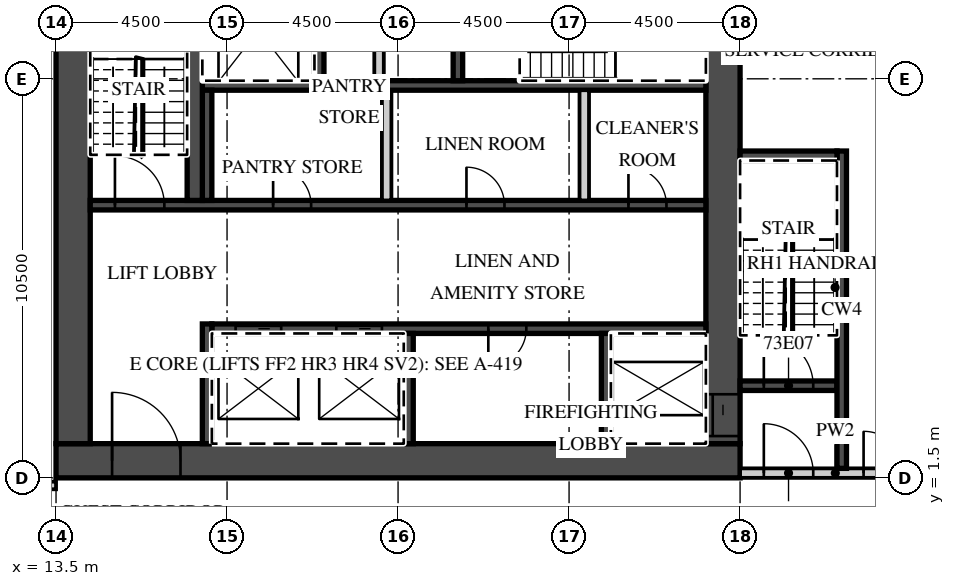
"""IFC4 building model, lengths in metres.
Left out: names, types, materials, properties, quantities, classifications, styles, units other than length and angle.
Written with IfcOpenShell. Run it as: python <this file> out.ifc"""

import sys

from ifc_helpers import new_model, si_unit, direction, frame, frame_2d, origin, place, context, subcontext, project, spatial, rectangle, extrude, element, fill, save


model = new_model("IFC4")
c1 = context("Model", 3, precision=1e-05, world=origin(), true_north=direction((0.0, 1.0)))
c2 = subcontext(c1, "Body", "Model", "MODEL_VIEW")
j1 = project(units=[si_unit("LENGTHUNIT", "METRE"), si_unit("PLANEANGLEUNIT", "RADIAN")], contexts=[c1])
p1 = place(None, origin())
s1 = spatial("IfcSite", under=j1, at=p1, CompositionType="ELEMENT")
p2 = place(p1, origin())
s2 = spatial("IfcBuilding", under=s1, at=p2, CompositionType="ELEMENT")
p3 = place(p2, frame((0.0, 0.0, 291.6)))
s3 = spatial("IfcBuildingStorey", under=s2, at=p3, CompositionType="ELEMENT", Elevation=291.6)
p4 = place(p3, frame((38.132, -12.858, 0.0), z_axis=(0.0, 0.0, 1.0), x_axis=(-0.095847749461, 0.995396006082, 0.0)))
e1 = element("IfcWall", 1, at=p4, inside=s3, PredefinedType="SOLIDWALL", context=c2, shape_type="SweptSolid", body=[
    extrude(rectangle(XDim=32.0, YDim=0.45, at=frame_2d((16.0, 0.0))), origin(), (0.0, 0.0, 1.0), 3.02),
])
p5 = place(p3, frame((-39.909, 1.3, 0.0), z_axis=(0.0, 0.0, 1.0), x_axis=(1.0, 0.0, 0.0)))
e2 = element("IfcWall", 2, at=p5, inside=s3, PredefinedType="PARTITIONING", context=c2, shape_type="SweptSolid", body=[
    extrude(rectangle(XDim=53.409, YDim=0.2, at=frame_2d((26.705, 0.0))), origin(), (0.0, 0.0, 1.0), 3.02),
])
p6 = place(p5, frame((0.255, 0.0, 0.0)))
e3 = element("IfcOpeningElement", 3, at=p6, cuts=e2, PredefinedType="OPENING", context=c2, shape_type="SweptSolid", body=[
    extrude(rectangle(XDim=0.9, YDim=2.1, at=frame_2d((0.45, 1.05))), frame((0.0, 0.11, 0.0), z_axis=(0.0, -1.0, 0.0), x_axis=(1.0, 0.0, 0.0)), (0.0, 0.0, 1.0), 0.22),
])
p7 = place(p5, frame((6.347, 0.0, 0.0)))
e4 = element("IfcOpeningElement", 4, at=p7, cuts=e2, PredefinedType="OPENING", context=c2, shape_type="SweptSolid", body=[
    extrude(rectangle(XDim=1.2, YDim=2.1, at=frame_2d((0.6, 1.05))), frame((0.0, 0.11, 0.0), z_axis=(0.0, -1.0, 0.0), x_axis=(1.0, 0.0, 0.0)), (0.0, 0.0, 1.0), 0.22),
])
p8 = place(p5, frame((13.484, 0.0, 0.0)))
e5 = element("IfcOpeningElement", 5, at=p8, cuts=e2, PredefinedType="OPENING", context=c2, shape_type="SweptSolid", body=[
    extrude(rectangle(XDim=1.0, YDim=2.1, at=frame_2d((0.5, 1.05))), frame((0.0, 0.11, 0.0), z_axis=(0.0, -1.0, 0.0), x_axis=(1.0, 0.0, 0.0)), (0.0, 0.0, 1.0), 0.22),
])
p9 = place(p5, frame((20.334, 0.0, 0.0)))
e6 = element("IfcOpeningElement", 6, at=p9, cuts=e2, PredefinedType="OPENING", context=c2, shape_type="SweptSolid", body=[
    extrude(rectangle(XDim=1.0, YDim=2.1, at=frame_2d((0.5, 1.05))), frame((0.0, 0.11, 0.0), z_axis=(0.0, -1.0, 0.0), x_axis=(1.0, 0.0, 0.0)), (0.0, 0.0, 1.0), 0.22),
])
p10 = place(p5, frame((22.484, 0.0, 0.0)))
e7 = element("IfcOpeningElement", 7, at=p10, cuts=e2, PredefinedType="OPENING", context=c2, shape_type="SweptSolid", body=[
    extrude(rectangle(XDim=1.0, YDim=2.1, at=frame_2d((0.5, 1.05))), frame((0.0, 0.11, 0.0), z_axis=(0.0, -1.0, 0.0), x_axis=(1.0, 0.0, 0.0)), (0.0, 0.0, 1.0), 0.22),
])
p11 = place(p5, frame((26.959, 0.0, 0.0)))
e8 = element("IfcOpeningElement", 8, at=p11, cuts=e2, PredefinedType="OPENING", context=c2, shape_type="SweptSolid", body=[
    extrude(rectangle(XDim=1.0, YDim=2.1, at=frame_2d((0.5, 1.05))), frame((0.0, 0.11, 0.0), z_axis=(0.0, -1.0, 0.0), x_axis=(1.0, 0.0, 0.0)), (0.0, 0.0, 1.0), 0.22),
])
p12 = place(p5, frame((36.271, 0.0, 0.0)))
e9 = element("IfcOpeningElement", 9, at=p12, cuts=e2, PredefinedType="OPENING", context=c2, shape_type="SweptSolid", body=[
    extrude(rectangle(XDim=1.2, YDim=2.1, at=frame_2d((0.6, 1.05))), frame((0.0, 0.11, 0.0), z_axis=(0.0, -1.0, 0.0), x_axis=(1.0, 0.0, 0.0)), (0.0, 0.0, 1.0), 0.22),
])
p13 = place(p5, frame((40.484, 0.0, 0.0)))
e10 = element("IfcOpeningElement", 10, at=p13, cuts=e2, PredefinedType="OPENING", context=c2, shape_type="SweptSolid", body=[
    extrude(rectangle(XDim=1.0, YDim=2.1, at=frame_2d((0.5, 1.05))), frame((0.0, 0.11, 0.0), z_axis=(0.0, -1.0, 0.0), x_axis=(1.0, 0.0, 0.0)), (0.0, 0.0, 1.0), 0.22),
])
p14 = place(p5, frame((44.959, 0.0, 0.0)))
e11 = element("IfcOpeningElement", 11, at=p14, cuts=e2, PredefinedType="OPENING", context=c2, shape_type="SweptSolid", body=[
    extrude(rectangle(XDim=1.0, YDim=2.1, at=frame_2d((0.5, 1.05))), frame((0.0, 0.11, 0.0), z_axis=(0.0, -1.0, 0.0), x_axis=(1.0, 0.0, 0.0)), (0.0, 0.0, 1.0), 0.22),
])
p15 = place(p5, frame((51.834, 0.0, 0.0)))
e12 = element("IfcOpeningElement", 12, at=p15, cuts=e2, PredefinedType="OPENING", context=c2, shape_type="SweptSolid", body=[
    extrude(rectangle(XDim=1.0, YDim=2.1, at=frame_2d((0.5, 1.05))), frame((0.0, 0.11, 0.0), z_axis=(0.0, -1.0, 0.0), x_axis=(1.0, 0.0, 0.0)), (0.0, 0.0, 1.0), 0.22),
])
p16 = place(p3, frame((13.5, 1.95, 0.0), z_axis=(0.0, 0.0, 1.0), x_axis=(1.0, 0.0, 0.0)))
e13 = element("IfcWall", 13, at=p16, inside=s3, PredefinedType="SHEAR", context=c2, shape_type="SweptSolid", body=[
    extrude(rectangle(XDim=18.0, YDim=0.9, at=frame_2d((9.0, 0.0))), origin(), (0.0, 0.0, 1.0), 3.02),
])
p17 = place(p16, frame((1.475, 0.0, 0.0)))
e14 = element("IfcOpeningElement", 14, at=p17, cuts=e13, PredefinedType="OPENING", context=c2, shape_type="SweptSolid", body=[
    extrude(rectangle(XDim=1.8, YDim=2.1, at=frame_2d((0.9, 1.05))), frame((0.0, 0.46, 0.0), z_axis=(0.0, -1.0, 0.0), x_axis=(1.0, 0.0, 0.0)), (0.0, 0.0, 1.0), 0.92),
])
p18 = place(p3, frame((31.05, 2.4, 0.0), z_axis=(0.0, 0.0, 1.0), x_axis=(0.0, 1.0, 0.0)))
e15 = element("IfcWall", 15, at=p18, inside=s3, PredefinedType="SHEAR", context=c2, shape_type="SweptSolid", body=[
    extrude(rectangle(XDim=12.8, YDim=0.9, at=frame_2d((6.4, 0.0))), origin(), (0.0, 0.0, 1.0), 3.02),
])
p19 = place(p18, frame((0.2, 0.0, 0.0)))
e16 = element("IfcOpeningElement", 16, at=p19, cuts=e15, PredefinedType="OPENING", context=c2, shape_type="SweptSolid", body=[
    extrude(rectangle(XDim=1.1, YDim=2.1, at=frame_2d((0.55, 1.05))), frame((0.0, 0.46, 0.0), z_axis=(0.0, -1.0, 0.0), x_axis=(1.0, 0.0, 0.0)), (0.0, 0.0, 1.0), 0.92),
])
p20 = place(p3, frame((13.95, 2.4, 0.0), z_axis=(0.0, 0.0, 1.0), x_axis=(0.0, 1.0, 0.0)))
e17 = element("IfcWall", 17, at=p20, inside=s3, PredefinedType="SHEAR", context=c2, shape_type="SweptSolid", body=[
    extrude(rectangle(XDim=12.2, YDim=0.9, at=frame_2d((6.1, 0.0))), origin(), (0.0, 0.0, 1.0), 3.02),
])
p21 = place(p3, frame((17.6, 5.425, 0.0), z_axis=(0.0, 0.0, 1.0), x_axis=(1.0, 0.0, 0.0)))
e18 = element("IfcWall", 18, at=p21, inside=s3, PredefinedType="SHEAR", context=c2, shape_type="SweptSolid", body=[
    extrude(rectangle(XDim=13.0, YDim=0.25, at=frame_2d((6.5, 0.0))), origin(), (0.0, 0.0, 1.0), 3.02),
])
p22 = place(p21, frame((3.275, 0.0, 0.0)))
e19 = element("IfcOpeningElement", 19, at=p22, cuts=e18, PredefinedType="OPENING", context=c2, shape_type="SweptSolid", body=[
    extrude(rectangle(XDim=1.2, YDim=2.1, at=frame_2d((0.6, 1.05))), frame((0.0, 0.135, 0.0), z_axis=(0.0, -1.0, 0.0), x_axis=(1.0, 0.0, 0.0)), (0.0, 0.0, 1.0), 0.27),
])
p23 = place(p21, frame((0.625, 0.0, 0.0)))
e20 = element("IfcOpeningElement", 20, at=p23, cuts=e18, PredefinedType="OPENING", context=c2, shape_type="SweptSolid", body=[
    extrude(rectangle(XDim=1.2, YDim=2.1, at=frame_2d((0.6, 1.05))), frame((0.0, 0.135, 0.0), z_axis=(0.0, -1.0, 0.0), x_axis=(1.0, 0.0, 0.0)), (0.0, 0.0, 1.0), 0.27),
])
p24 = place(p21, frame((7.275, 0.0, 0.0)))
e21 = element("IfcOpeningElement", 21, at=p24, cuts=e18, PredefinedType="OPENING", context=c2, shape_type="SweptSolid", body=[
    extrude(rectangle(XDim=1.0, YDim=2.1, at=frame_2d((0.5, 1.05))), frame((0.0, 0.135, 0.0), z_axis=(0.0, -1.0, 0.0), x_axis=(1.0, 0.0, 0.0)), (0.0, 0.0, 1.0), 0.27),
])
p25 = place(p3, frame((17.475, 2.4, 0.0), z_axis=(0.0, 0.0, 1.0), x_axis=(0.0, 1.0, 0.0)))
e22 = element("IfcWall", 22, at=p25, inside=s3, PredefinedType="SHEAR", context=c2, shape_type="SweptSolid", body=[
    extrude(rectangle(XDim=3.15, YDim=0.25, at=frame_2d((1.575, 0.0))), origin(), (0.0, 0.0, 1.0), 3.02),
])
for number, where, z_axis, x_axis in (
    (23, (27.975, 2.4, 0.0), (0.0, 0.0, 1.0), (0.0, 1.0, 0.0)),
    (24, (22.775, 2.4, 0.0), (0.0, 0.0, 1.0), (0.0, 1.0, 0.0)),
):
    element("IfcWall", number, at=place(p3, frame(where, z_axis=z_axis, x_axis=x_axis)), inside=s3, PredefinedType="SHEAR", context=c2, shape_type="SweptSolid", body=[
        extrude(rectangle(XDim=2.9, YDim=0.25, at=frame_2d((1.45, 0.0))), origin(), (0.0, 0.0, 1.0), 3.02),
    ])
p26 = place(p3, frame((14.4, 8.675, 0.0), z_axis=(0.0, 0.0, 1.0), x_axis=(1.0, 0.0, 0.0)))
e25 = element("IfcWall", 25, at=p26, inside=s3, PredefinedType="SHEAR", context=c2, shape_type="SweptSolid", body=[
    extrude(rectangle(XDim=16.2, YDim=0.25, at=frame_2d((8.1, 0.0))), origin(), (0.0, 0.0, 1.0), 3.02),
])
p27 = place(p26, frame((0.65, 0.0, 0.0)))
e26 = element("IfcOpeningElement", 26, at=p27, cuts=e25, PredefinedType="OPENING", context=c2, shape_type="SweptSolid", body=[
    extrude(rectangle(XDim=1.3, YDim=2.1, at=frame_2d((0.65, 1.05))), frame((0.0, 0.135, 0.0), z_axis=(0.0, -1.0, 0.0), x_axis=(1.0, 0.0, 0.0)), (0.0, 0.0, 1.0), 0.27),
])
p28 = place(p26, frame((14.163, 0.0, 0.0)))
e27 = element("IfcOpeningElement", 27, at=p28, cuts=e25, PredefinedType="OPENING", context=c2, shape_type="SweptSolid", body=[
    extrude(rectangle(XDim=1.0, YDim=2.1, at=frame_2d((0.5, 1.05))), frame((0.0, 0.135, 0.0), z_axis=(0.0, -1.0, 0.0), x_axis=(1.0, 0.0, 0.0)), (0.0, 0.0, 1.0), 0.27),
])
p29 = place(p26, frame((9.9, 0.0, 0.0)))
e28 = element("IfcOpeningElement", 28, at=p29, cuts=e25, PredefinedType="OPENING", context=c2, shape_type="SweptSolid", body=[
    extrude(rectangle(XDim=1.0, YDim=2.1, at=frame_2d((0.5, 1.05))), frame((0.0, 0.135, 0.0), z_axis=(0.0, -1.0, 0.0), x_axis=(1.0, 0.0, 0.0)), (0.0, 0.0, 1.0), 0.27),
])
p30 = place(p26, frame((4.812, 0.0, 0.0)))
e29 = element("IfcOpeningElement", 29, at=p30, cuts=e25, PredefinedType="OPENING", context=c2, shape_type="SweptSolid", body=[
    extrude(rectangle(XDim=1.0, YDim=2.1, at=frame_2d((0.5, 1.05))), frame((0.0, 0.135, 0.0), z_axis=(0.0, -1.0, 0.0), x_axis=(1.0, 0.0, 0.0)), (0.0, 0.0, 1.0), 0.27),
])
p31 = place(p3, frame((17.35, 11.825, 0.0), z_axis=(0.0, 0.0, 1.0), x_axis=(1.0, 0.0, 0.0)))
e30 = element("IfcWall", 30, at=p31, inside=s3, PredefinedType="SHEAR", context=c2, shape_type="SweptSolid", body=[
    extrude(rectangle(XDim=13.25, YDim=0.25, at=frame_2d((6.625, 0.0))), origin(), (0.0, 0.0, 1.0), 3.02),
])
p32 = place(p3, frame((17.475, 8.8, 0.0), z_axis=(0.0, 0.0, 1.0), x_axis=(0.0, 1.0, 0.0)))
e31 = element("IfcWall", 31, at=p32, inside=s3, PredefinedType="SHEAR", context=c2, shape_type="SweptSolid", body=[
    extrude(rectangle(XDim=2.9, YDim=0.25, at=frame_2d((1.45, 0.0))), origin(), (0.0, 0.0, 1.0), 3.02),
])
for number, where, z_axis, x_axis in (
    (32, (27.4, 8.8, 0.0), (0.0, 0.0, 1.0), (0.0, 1.0, 0.0)),
    (33, (22.2, 8.8, 0.0), (0.0, 0.0, 1.0), (0.0, 1.0, 0.0)),
):
    element("IfcWall", number, at=place(p3, frame(where, z_axis=z_axis, x_axis=x_axis)), inside=s3, PredefinedType="PARTITIONING", context=c2, shape_type="SweptSolid", body=[
        extrude(rectangle(XDim=2.9, YDim=0.25, at=frame_2d((1.45, 0.0))), origin(), (0.0, 0.0, 1.0), 3.02),
    ])
p33 = place(p3, frame((17.15, 8.8, 0.0), z_axis=(0.0, 0.0, 1.0), x_axis=(0.0, 1.0, 0.0)))
e34 = element("IfcWall", 34, at=p33, inside=s3, PredefinedType="SHEAR", context=c2, shape_type="SweptSolid", body=[
    extrude(rectangle(XDim=5.8, YDim=0.4, at=frame_2d((2.9, 0.0))), origin(), (0.0, 0.0, 1.0), 3.02),
])
for number, where, z_axis, x_axis in (
    (35, (20.425, 11.95, 0.0), (0.0, 0.0, 1.0), (0.0, 1.0, 0.0)),
    (36, (24.075, 11.95, 0.0), (0.0, 0.0, 1.0), (0.0, 1.0, 0.0)),
):
    element("IfcWall", number, at=place(p3, frame(where, z_axis=z_axis, x_axis=x_axis)), inside=s3, PredefinedType="SHEAR", context=c2, shape_type="SweptSolid", body=[
        extrude(rectangle(XDim=3.25, YDim=0.25, at=frame_2d((1.625, 0.0))), origin(), (0.0, 0.0, 1.0), 3.02),
    ])
p34 = place(p3, frame((22.0, 11.95, 0.0), z_axis=(0.0, 0.0, 1.0), x_axis=(0.0, 1.0, 0.0)))
e37 = element("IfcWall", 37, at=p34, inside=s3, PredefinedType="PARTITIONING", context=c2, shape_type="SweptSolid", body=[
    extrude(rectangle(XDim=3.25, YDim=0.25, at=frame_2d((1.625, 0.0))), origin(), (0.0, 0.0, 1.0), 3.02),
])
p35 = place(p3, frame((31.5, 1.625, 0.0), z_axis=(0.0, 0.0, 1.0), x_axis=(1.0, 0.0, 0.0)))
e38 = element("IfcWall", 38, at=p35, inside=s3, PredefinedType="PARTITIONING", context=c2, shape_type="SweptSolid", body=[
    extrude(rectangle(XDim=5.012, YDim=0.25, at=frame_2d((2.506, 0.0))), origin(), (0.0, 0.0, 1.0), 3.02),
])
p36 = place(p35, frame((0.625, 0.0, 0.0)))
e39 = element("IfcOpeningElement", 39, at=p36, cuts=e38, PredefinedType="OPENING", context=c2, shape_type="SweptSolid", body=[
    extrude(rectangle(XDim=1.3, YDim=2.1, at=frame_2d((0.65, 1.05))), frame((0.0, 0.135, 0.0), z_axis=(0.0, -1.0, 0.0), x_axis=(1.0, 0.0, 0.0)), (0.0, 0.0, 1.0), 0.27),
])
p37 = place(p35, frame((3.25, 0.0, 0.0)))
e40 = element("IfcOpeningElement", 40, at=p37, cuts=e38, PredefinedType="OPENING", context=c2, shape_type="SweptSolid", body=[
    extrude(rectangle(XDim=1.1, YDim=2.1, at=frame_2d((0.55, 1.05))), frame((0.0, 0.135, 0.0), z_axis=(0.0, -1.0, 0.0), x_axis=(1.0, 0.0, 0.0)), (0.0, 0.0, 1.0), 0.27),
])
p38 = place(p3, frame((31.5, 3.925, 0.0), z_axis=(0.0, 0.0, 1.0), x_axis=(1.0, 0.0, 0.0)))
e41 = element("IfcWall", 41, at=p38, inside=s3, PredefinedType="SHEAR", context=c2, shape_type="SweptSolid", body=[
    extrude(rectangle(XDim=2.55, YDim=0.25, at=frame_2d((1.275, 0.0))), origin(), (0.0, 0.0, 1.0), 3.02),
])
p39 = place(p38, frame((0.625, 0.0, 0.0)))
e42 = element("IfcOpeningElement", 42, at=p39, cuts=e41, PredefinedType="OPENING", context=c2, shape_type="SweptSolid", body=[
    extrude(rectangle(XDim=1.3, YDim=2.1, at=frame_2d((0.65, 1.05))), frame((0.0, 0.135, 0.0), z_axis=(0.0, -1.0, 0.0), x_axis=(1.0, 0.0, 0.0)), (0.0, 0.0, 1.0), 0.27),
])
p40 = place(p3, frame((34.175, 1.75, 0.0), z_axis=(0.0, 0.0, 1.0), x_axis=(0.0, 1.0, 0.0)))
e43 = element("IfcWall", 43, at=p40, inside=s3, PredefinedType="SHEAR", context=c2, shape_type="SweptSolid", body=[
    extrude(rectangle(XDim=8.35, YDim=0.25, at=frame_2d((4.175, 0.0))), origin(), (0.0, 0.0, 1.0), 3.02),
])
p41 = place(p3, frame((31.5, 9.975, 0.0), z_axis=(0.0, 0.0, 1.0), x_axis=(1.0, 0.0, 0.0)))
e44 = element("IfcWall", 44, at=p41, inside=s3, PredefinedType="SHEAR", context=c2, shape_type="SweptSolid", body=[
    extrude(rectangle(XDim=2.55, YDim=0.25, at=frame_2d((1.275, 0.0))), origin(), (0.0, 0.0, 1.0), 3.02),
])
p42 = place(p22, origin())
e45 = element("IfcDoor", 45, at=p42, inside=s3, OperationType="SLIDING_TO_RIGHT", PredefinedType="DOOR", context=c2, shape_type="SweptSolid", body=[
    extrude(rectangle(XDim=1.2, YDim=2.1, at=frame_2d((0.6, 1.05))), frame((0.0, 0.025, 0.0), z_axis=(0.0, -1.0, 0.0), x_axis=(1.0, 0.0, 0.0)), (0.0, 0.0, 1.0), 0.05),
])
fill(e19, e45)
p43 = place(p23, origin())
e46 = element("IfcDoor", 46, at=p43, inside=s3, OperationType="SLIDING_TO_LEFT", PredefinedType="DOOR", context=c2, shape_type="SweptSolid", body=[
    extrude(rectangle(XDim=1.2, YDim=2.1, at=frame_2d((0.6, 1.05))), frame((0.0, 0.025, 0.0), z_axis=(0.0, -1.0, 0.0), x_axis=(1.0, 0.0, 0.0)), (0.0, 0.0, 1.0), 0.05),
])
fill(e20, e46)
p44 = place(p19, origin())
e47 = element("IfcDoor", 47, at=p44, inside=s3, OperationType="SLIDING_TO_LEFT", PredefinedType="DOOR", context=c2, shape_type="SweptSolid", body=[
    extrude(rectangle(XDim=1.1, YDim=2.1, at=frame_2d((0.55, 1.05))), frame((0.0, 0.025, 0.0), z_axis=(0.0, -1.0, 0.0), x_axis=(1.0, 0.0, 0.0)), (0.0, 0.0, 1.0), 0.05),
])
fill(e16, e47)
p45 = place(p17, origin())
e48 = element("IfcDoor", 48, at=p45, inside=s3, OperationType="DOUBLE_DOOR_DOUBLE_SWING", PredefinedType="DOOR", context=c2, shape_type="SweptSolid", body=[
    extrude(rectangle(XDim=1.8, YDim=2.1, at=frame_2d((0.9, 1.05))), frame((0.0, 0.025, 0.0), z_axis=(0.0, -1.0, 0.0), x_axis=(1.0, 0.0, 0.0)), (0.0, 0.0, 1.0), 0.05),
])
fill(e14, e48)
p46 = place(p36, origin())
e49 = element("IfcDoor", 49, at=p46, inside=s3, OperationType="SINGLE_SWING_LEFT", PredefinedType="DOOR", context=c2, shape_type="SweptSolid", body=[
    extrude(rectangle(XDim=1.3, YDim=2.1, at=frame_2d((0.65, 1.05))), frame((0.0, 0.025, 0.0), z_axis=(0.0, -1.0, 0.0), x_axis=(1.0, 0.0, 0.0)), (0.0, 0.0, 1.0), 0.05),
])
fill(e39, e49)
p47 = place(p39, origin())
e50 = element("IfcDoor", 50, at=p47, inside=s3, OperationType="SINGLE_SWING_LEFT", PredefinedType="DOOR", context=c2, shape_type="SweptSolid", body=[
    extrude(rectangle(XDim=1.3, YDim=2.1, at=frame_2d((0.65, 1.05))), frame((0.0, 0.025, 0.0), z_axis=(0.0, -1.0, 0.0), x_axis=(1.0, 0.0, 0.0)), (0.0, 0.0, 1.0), 0.05),
])
fill(e42, e50)
p48 = place(p37, origin())
e51 = element("IfcDoor", 51, at=p48, inside=s3, OperationType="SINGLE_SWING_LEFT", PredefinedType="DOOR", context=c2, shape_type="SweptSolid", body=[
    extrude(rectangle(XDim=1.1, YDim=2.1, at=frame_2d((0.55, 1.05))), frame((0.0, 0.025, 0.0), z_axis=(0.0, -1.0, 0.0), x_axis=(1.0, 0.0, 0.0)), (0.0, 0.0, 1.0), 0.05),
])
fill(e40, e51)
p49 = place(p27, origin())
e52 = element("IfcDoor", 52, at=p49, inside=s3, OperationType="SINGLE_SWING_LEFT", PredefinedType="DOOR", context=c2, shape_type="SweptSolid", body=[
    extrude(rectangle(XDim=1.3, YDim=2.1, at=frame_2d((0.65, 1.05))), frame((0.0, 0.025, 0.0), z_axis=(0.0, -1.0, 0.0), x_axis=(1.0, 0.0, 0.0)), (0.0, 0.0, 1.0), 0.05),
])
fill(e26, e52)
p50 = place(p28, origin())
e53 = element("IfcDoor", 53, at=p50, inside=s3, OperationType="SINGLE_SWING_LEFT", PredefinedType="DOOR", context=c2, shape_type="SweptSolid", body=[
    extrude(rectangle(XDim=1.0, YDim=2.1, at=frame_2d((0.5, 1.05))), frame((0.0, 0.025, 0.0), z_axis=(0.0, -1.0, 0.0), x_axis=(1.0, 0.0, 0.0)), (0.0, 0.0, 1.0), 0.05),
])
fill(e27, e53)
p51 = place(p29, origin())
e54 = element("IfcDoor", 54, at=p51, inside=s3, OperationType="SINGLE_SWING_LEFT", PredefinedType="DOOR", context=c2, shape_type="SweptSolid", body=[
    extrude(rectangle(XDim=1.0, YDim=2.1, at=frame_2d((0.5, 1.05))), frame((0.0, 0.025, 0.0), z_axis=(0.0, -1.0, 0.0), x_axis=(1.0, 0.0, 0.0)), (0.0, 0.0, 1.0), 0.05),
])
fill(e28, e54)
p52 = place(p30, origin())
e55 = element("IfcDoor", 55, at=p52, inside=s3, OperationType="SINGLE_SWING_LEFT", PredefinedType="DOOR", context=c2, shape_type="SweptSolid", body=[
    extrude(rectangle(XDim=1.0, YDim=2.1, at=frame_2d((0.5, 1.05))), frame((0.0, 0.025, 0.0), z_axis=(0.0, -1.0, 0.0), x_axis=(1.0, 0.0, 0.0)), (0.0, 0.0, 1.0), 0.05),
])
fill(e29, e55)
p53 = place(p24, origin())
e56 = element("IfcDoor", 56, at=p53, inside=s3, OperationType="SINGLE_SWING_LEFT", PredefinedType="DOOR", context=c2, shape_type="SweptSolid", body=[
    extrude(rectangle(XDim=1.0, YDim=2.1, at=frame_2d((0.5, 1.05))), frame((0.0, 0.025, 0.0), z_axis=(0.0, -1.0, 0.0), x_axis=(1.0, 0.0, 0.0)), (0.0, 0.0, 1.0), 0.05),
])
fill(e21, e56)
save(model, sys.argv[1])
